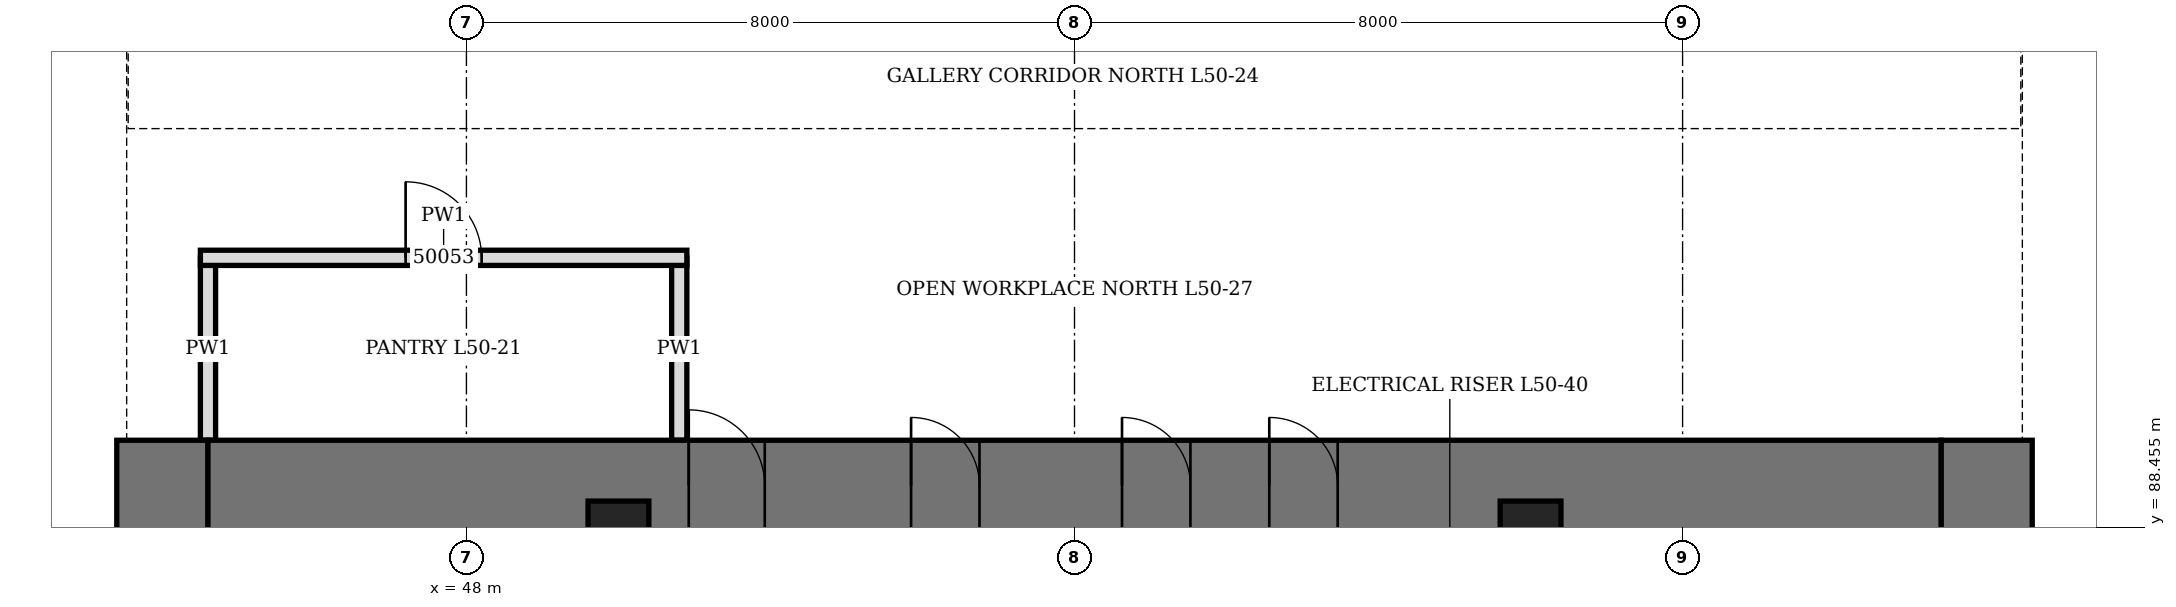
"""IFC4 building model, lengths in metres.
Left out: names, types, materials, properties, quantities, classifications, styles, units other than length and angle.
Written with IfcOpenShell. Run it as: python <this file> out.ifc"""

import sys

from ifc_helpers import new_model, si_unit, direction, frame, frame_2d, origin, origin_2d, place, context, subcontext, project, spatial, rectangle, hollow_rectangle, extrude, element, fill, save


model = new_model("IFC4")
c1 = context("Model", 3, precision=1e-05, world=origin(), true_north=direction((0.0, 1.0)))
c2 = subcontext(c1, "Body", "Model", "MODEL_VIEW")
j1 = project(units=[si_unit("LENGTHUNIT", "METRE"), si_unit("PLANEANGLEUNIT", "RADIAN")], contexts=[c1])
p1 = place(None, origin())
s1 = spatial("IfcSite", under=j1, at=p1, CompositionType="ELEMENT")
p2 = place(p1, origin())
s2 = spatial("IfcBuilding", under=s1, at=p2, CompositionType="ELEMENT")
p3 = place(p2, frame((0.0, 0.0, 223.3)))
s3 = spatial("IfcBuildingStorey", under=s2, at=p3, CompositionType="ELEMENT", Elevation=223.3)
p4 = place(p3, frame((44.0, 70.4, 0.0), z_axis=(0.0, 0.0, 1.0), x_axis=(0.0, 1.0, 0.0)))
e1 = element("IfcWall", 1, at=p4, inside=s3, PredefinedType="SHEAR", context=c2, shape_type="SweptSolid", body=[
    extrude(rectangle(XDim=19.2, YDim=1.2, at=frame_2d((9.6, 0.0))), origin(), (0.0, 0.0, 1.0), 4.2),
])
p5 = place(p4, frame((8.6, 0.0, 0.0)))
e2 = element("IfcOpeningElement", 2, at=p5, cuts=e1, PredefinedType="OPENING", context=c2, shape_type="SweptSolid", body=[
    extrude(rectangle(XDim=2.0, YDim=2.4, at=frame_2d((1.0, 1.2))), frame((0.0, 0.61, 0.0), z_axis=(0.0, -1.0, 0.0), x_axis=(1.0, 0.0, 0.0)), (0.0, 0.0, 1.0), 1.22),
])
p6 = place(p3, frame((68.0, 70.4, 0.0), z_axis=(0.0, 0.0, 1.0), x_axis=(0.0, 1.0, 0.0)))
e3 = element("IfcWall", 3, at=p6, inside=s3, PredefinedType="SHEAR", context=c2, shape_type="SweptSolid", body=[
    extrude(rectangle(XDim=19.2, YDim=1.2, at=frame_2d((9.6, 0.0))), origin(), (0.0, 0.0, 1.0), 4.2),
])
p7 = place(p6, frame((8.6, 0.0, 0.0)))
e4 = element("IfcOpeningElement", 4, at=p7, cuts=e3, PredefinedType="OPENING", context=c2, shape_type="SweptSolid", body=[
    extrude(rectangle(XDim=2.0, YDim=2.4, at=frame_2d((1.0, 1.2))), frame((0.0, 0.61, 0.0), z_axis=(0.0, -1.0, 0.0), x_axis=(1.0, 0.0, 0.0)), (0.0, 0.0, 1.0), 1.22),
])
p8 = place(p3, frame((44.6, 89.0, 0.0), z_axis=(0.0, 0.0, 1.0), x_axis=(1.0, 0.0, 0.0)))
e5 = element("IfcWall", 5, at=p8, inside=s3, PredefinedType="SHEAR", context=c2, shape_type="SweptSolid", body=[
    extrude(rectangle(XDim=22.8, YDim=1.2, at=frame_2d((11.4, 0.0))), origin(), (0.0, 0.0, 1.0), 4.2),
])
p9 = place(p8, frame((6.325, 0.0, 0.0)))
e6 = element("IfcOpeningElement", 6, at=p9, cuts=e5, PredefinedType="OPENING", context=c2, shape_type="SweptSolid", body=[
    extrude(rectangle(XDim=1.0, YDim=2.1, at=frame_2d((0.5, 1.05))), frame((0.0, 0.61, 0.0), z_axis=(0.0, -1.0, 0.0), x_axis=(1.0, 0.0, 0.0)), (0.0, 0.0, 1.0), 1.22),
])
p10 = place(p8, frame((9.25, 0.0, 0.0)))
e7 = element("IfcOpeningElement", 7, at=p10, cuts=e5, PredefinedType="OPENING", context=c2, shape_type="SweptSolid", body=[
    extrude(rectangle(XDim=0.9, YDim=2.1, at=frame_2d((0.45, 1.05))), frame((0.0, 0.61, 0.0), z_axis=(0.0, -1.0, 0.0), x_axis=(1.0, 0.0, 0.0)), (0.0, 0.0, 1.0), 1.22),
])
p11 = place(p8, frame((12.025, 0.0, 0.0)))
e8 = element("IfcOpeningElement", 8, at=p11, cuts=e5, PredefinedType="OPENING", context=c2, shape_type="SweptSolid", body=[
    extrude(rectangle(XDim=0.9, YDim=2.1, at=frame_2d((0.45, 1.05))), frame((0.0, 0.61, 0.0), z_axis=(0.0, -1.0, 0.0), x_axis=(1.0, 0.0, 0.0)), (0.0, 0.0, 1.0), 1.22),
])
p12 = place(p8, frame((13.962, 0.0, 0.0)))
e9 = element("IfcOpeningElement", 9, at=p12, cuts=e5, PredefinedType="OPENING", context=c2, shape_type="SweptSolid", body=[
    extrude(rectangle(XDim=0.9, YDim=2.1, at=frame_2d((0.45, 1.05))), frame((0.0, 0.61, 0.0), z_axis=(0.0, -1.0, 0.0), x_axis=(1.0, 0.0, 0.0)), (0.0, 0.0, 1.0), 1.22),
])
for number, where, z_axis, x_axis in (
    (10, (50.0, 88.4, 0.0), (0.0, 0.0, 1.0), (1.0, 0.0, 0.0)),
    (11, (62.0, 88.4, 0.0), (0.0, 0.0, 1.0), (1.0, 0.0, 0.0)),
):
    element("IfcColumn", number, at=place(p3, frame(where, z_axis=z_axis, x_axis=x_axis)), inside=s3, PredefinedType="COLUMN", context=c2, shape_type="SweptSolid", body=[
        extrude(hollow_rectangle(XDim=0.8, YDim=0.8, WallThickness=0.1, at=origin_2d()), origin(), (0.0, 0.0, 1.0), 4.2),
    ])
for number, where, z_axis, x_axis in (
    (12, (44.6, 89.6, 0.0), (0.0, 0.0, 1.0), (0.0, 1.0, 0.0)),
    (13, (50.8, 89.6, 0.0), (0.0, 0.0, 1.0), (0.0, 1.0, 0.0)),
):
    element("IfcWall", number, at=place(p3, frame(where, z_axis=z_axis, x_axis=x_axis)), inside=s3, PredefinedType="PARTITIONING", context=c2, shape_type="SweptSolid", body=[
        extrude(rectangle(XDim=2.4, YDim=0.2, at=frame_2d((1.2, 0.0))), origin(), (0.0, 0.0, 1.0), 4.04),
    ])
p13 = place(p3, frame((44.5, 92.0, 0.0), z_axis=(0.0, 0.0, 1.0), x_axis=(1.0, 0.0, 0.0)))
e14 = element("IfcWall", 14, at=p13, inside=s3, PredefinedType="PARTITIONING", context=c2, shape_type="SweptSolid", body=[
    extrude(rectangle(XDim=6.4, YDim=0.2, at=frame_2d((3.2, 0.0))), origin(), (0.0, 0.0, 1.0), 4.04),
])
p14 = place(p13, frame((2.7, 0.0, 0.0)))
e15 = element("IfcOpeningElement", 15, at=p14, cuts=e14, PredefinedType="OPENING", context=c2, shape_type="SweptSolid", body=[
    extrude(rectangle(XDim=1.0, YDim=2.1, at=frame_2d((0.5, 1.05))), frame((0.0, 0.11, 0.0), z_axis=(0.0, -1.0, 0.0), x_axis=(1.0, 0.0, 0.0)), (0.0, 0.0, 1.0), 0.22),
])
p15 = place(p9, origin())
e16 = element("IfcDoor", 16, at=p15, inside=s3, OperationType="SINGLE_SWING_LEFT", PredefinedType="DOOR", context=c2, shape_type="SweptSolid", body=[
    extrude(rectangle(XDim=1.0, YDim=2.1, at=frame_2d((0.5, 1.05))), frame((0.0, 0.35, 0.0), z_axis=(0.0, -1.0, 0.0), x_axis=(1.0, 0.0, 0.0)), (0.0, 0.0, 1.0), 0.7),
])
fill(e6, e16)
p16 = place(p10, origin())
e17 = element("IfcDoor", 17, at=p16, inside=s3, OperationType="SINGLE_SWING_LEFT", PredefinedType="DOOR", context=c2, shape_type="SweptSolid", body=[
    extrude(rectangle(XDim=0.9, YDim=2.1, at=frame_2d((0.45, 1.05))), frame((0.0, 0.35, 0.0), z_axis=(0.0, -1.0, 0.0), x_axis=(1.0, 0.0, 0.0)), (0.0, 0.0, 1.0), 0.7),
])
fill(e7, e17)
p17 = place(p11, origin())
e18 = element("IfcDoor", 18, at=p17, inside=s3, OperationType="SINGLE_SWING_LEFT", PredefinedType="DOOR", context=c2, shape_type="SweptSolid", body=[
    extrude(rectangle(XDim=0.9, YDim=2.1, at=frame_2d((0.45, 1.05))), frame((0.0, 0.35, 0.0), z_axis=(0.0, -1.0, 0.0), x_axis=(1.0, 0.0, 0.0)), (0.0, 0.0, 1.0), 0.7),
])
fill(e8, e18)
p18 = place(p12, origin())
e19 = element("IfcDoor", 19, at=p18, inside=s3, OperationType="SINGLE_SWING_LEFT", PredefinedType="DOOR", context=c2, shape_type="SweptSolid", body=[
    extrude(rectangle(XDim=0.9, YDim=2.1, at=frame_2d((0.45, 1.05))), frame((0.0, 0.35, 0.0), z_axis=(0.0, -1.0, 0.0), x_axis=(1.0, 0.0, 0.0)), (0.0, 0.0, 1.0), 0.7),
])
fill(e9, e19)
p19 = place(p14, origin())
e20 = element("IfcDoor", 20, at=p19, inside=s3, OperationType="SINGLE_SWING_LEFT", PredefinedType="DOOR", context=c2, shape_type="SweptSolid", body=[
    extrude(rectangle(XDim=1.0, YDim=2.1, at=frame_2d((0.5, 1.05))), frame((0.0, 0.1, 0.0), z_axis=(0.0, -1.0, 0.0), x_axis=(1.0, 0.0, 0.0)), (0.0, 0.0, 1.0), 0.199),
])
fill(e15, e20)
save(model, sys.argv[1])
